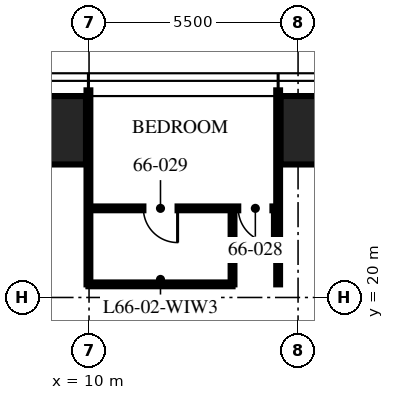
"""IFC4 building model, lengths in metres.
Left out: names, types, materials, properties, quantities, classifications, styles, units other than length and angle.
Written with IfcOpenShell. Run it as: python <this file> out.ifc"""

import sys

from ifc_helpers import new_model, si_unit, direction, frame, frame_2d, origin, origin_2d, place, context, subcontext, project, spatial, rectangle, hollow_rectangle, extrude, element, fill, save


model = new_model("IFC4")
c1 = context("Model", 3, precision=1e-05, world=origin(), true_north=direction((0.0, 1.0)))
c2 = subcontext(c1, "Body", "Model", "MODEL_VIEW")
j1 = project(units=[si_unit("LENGTHUNIT", "METRE"), si_unit("PLANEANGLEUNIT", "RADIAN")], contexts=[c1])
p1 = place(None, origin())
s1 = spatial("IfcSite", under=j1, at=p1, CompositionType="ELEMENT")
p2 = place(p1, origin())
s2 = spatial("IfcBuilding", under=s1, at=p2, CompositionType="ELEMENT")
p3 = place(p2, frame((0.0, 0.0, 263.25)))
s3 = spatial("IfcBuildingStorey", under=s2, at=p3, CompositionType="ELEMENT", Elevation=263.25)
for number, where, z_axis, x_axis in (
    (1, (8.32, 24.4, 0.0), (0.0, 0.0, 1.0), (1.0, 0.0, 0.0)),
    (2, (16.64, 24.4, 0.0), (0.0, 0.0, 1.0), (1.0, 0.0, 0.0)),
):
    element("IfcColumn", number, at=place(p3, frame(where, z_axis=z_axis, x_axis=x_axis)), inside=s3, PredefinedType="COLUMN", context=c2, shape_type="SweptSolid", body=[
        extrude(hollow_rectangle(XDim=3.2, YDim=1.8, WallThickness=0.14, at=origin_2d()), origin(), (0.0, 0.0, 1.0), 3.75),
    ])
for number, where, z_axis, x_axis in (
    (3, (14.976, 20.345, 0.0), (0.0, 0.0, 1.0), (0.0, 1.0, 0.0)),
    (4, (9.984, 20.345, 0.0), (0.0, 0.0, 1.0), (0.0, 1.0, 0.0)),
):
    element("IfcWall", number, at=place(p3, frame(where, z_axis=z_axis, x_axis=x_axis)), inside=s3, PredefinedType="PARTITIONING", context=c2, shape_type="SweptSolid", body=[
        extrude(rectangle(XDim=5.105, YDim=0.1, at=frame_2d((2.552, 0.0))), origin(), (0.0, 0.0, 1.0), 2.91),
    ])
p4 = place(p3, frame((14.976, 22.345, 0.0), z_axis=(0.0, 0.0, 1.0), x_axis=(-1.0, 0.0, 0.0)))
e5 = element("IfcWall", 5, at=p4, inside=s3, PredefinedType="PARTITIONING", context=c2, shape_type="SweptSolid", body=[
    extrude(rectangle(XDim=4.992, YDim=0.1, at=frame_2d((2.496, 0.0))), origin(), (0.0, 0.0, 1.0), 2.81),
])
p5 = place(p4, frame((0.15, 0.0, 0.0)))
e6 = element("IfcOpeningElement", 6, at=p5, cuts=e5, PredefinedType="OPENING", context=c2, shape_type="SweptSolid", body=[
    extrude(rectangle(XDim=0.9, YDim=2.1, at=frame_2d((0.45, 1.05))), frame((0.0, 0.06, 0.0), z_axis=(0.0, -1.0, 0.0), x_axis=(1.0, 0.0, 0.0)), (0.0, 0.0, 1.0), 0.12),
])
p6 = place(p4, frame((2.646, 0.0, 0.0)))
e7 = element("IfcOpeningElement", 7, at=p6, cuts=e5, PredefinedType="OPENING", context=c2, shape_type="SweptSolid", body=[
    extrude(rectangle(XDim=0.9, YDim=2.1, at=frame_2d((0.45, 1.05))), frame((0.0, 0.06, 0.0), z_axis=(0.0, -1.0, 0.0), x_axis=(1.0, 0.0, 0.0)), (0.0, 0.0, 1.0), 0.12),
])
p7 = place(p3, frame((13.776, 20.345, 0.0), z_axis=(0.0, 0.0, 1.0), x_axis=(0.0, 1.0, 0.0)))
e8 = element("IfcWall", 8, at=p7, inside=s3, PredefinedType="PARTITIONING", context=c2, shape_type="SweptSolid", body=[
    extrude(rectangle(XDim=2.0, YDim=0.1, at=frame_2d((1.0, 0.0))), origin(), (0.0, 0.0, 1.0), 3.5),
])
p8 = place(p3, frame((13.776, 20.345, 0.0), z_axis=(0.0, 0.0, 1.0), x_axis=(-1.0, 0.0, 0.0)))
e9 = element("IfcWall", 9, at=p8, inside=s3, PredefinedType="PARTITIONING", context=c2, shape_type="SweptSolid", body=[
    extrude(rectangle(XDim=3.792, YDim=0.1, at=frame_2d((1.896, 0.0))), origin(), (0.0, 0.0, 1.0), 2.81),
])
p9 = place(p5, origin())
e10 = element("IfcDoor", 10, at=p9, inside=s3, OperationType="SINGLE_SWING_LEFT", PredefinedType="DOOR", context=c2, shape_type="SweptSolid", body=[
    extrude(rectangle(XDim=0.9, YDim=2.1, at=frame_2d((0.45, 1.05))), frame((0.0, 0.025, 0.0), z_axis=(0.0, -1.0, 0.0), x_axis=(1.0, 0.0, 0.0)), (0.0, 0.0, 1.0), 0.05),
])
fill(e6, e10)
p10 = place(p6, origin())
e11 = element("IfcDoor", 11, at=p10, inside=s3, OperationType="SINGLE_SWING_LEFT", PredefinedType="DOOR", context=c2, shape_type="SweptSolid", body=[
    extrude(rectangle(XDim=0.9, YDim=2.1, at=frame_2d((0.45, 1.05))), frame((0.0, 0.025, 0.0), z_axis=(0.0, -1.0, 0.0), x_axis=(1.0, 0.0, 0.0)), (0.0, 0.0, 1.0), 0.05),
])
fill(e7, e11)
save(model, sys.argv[1])
